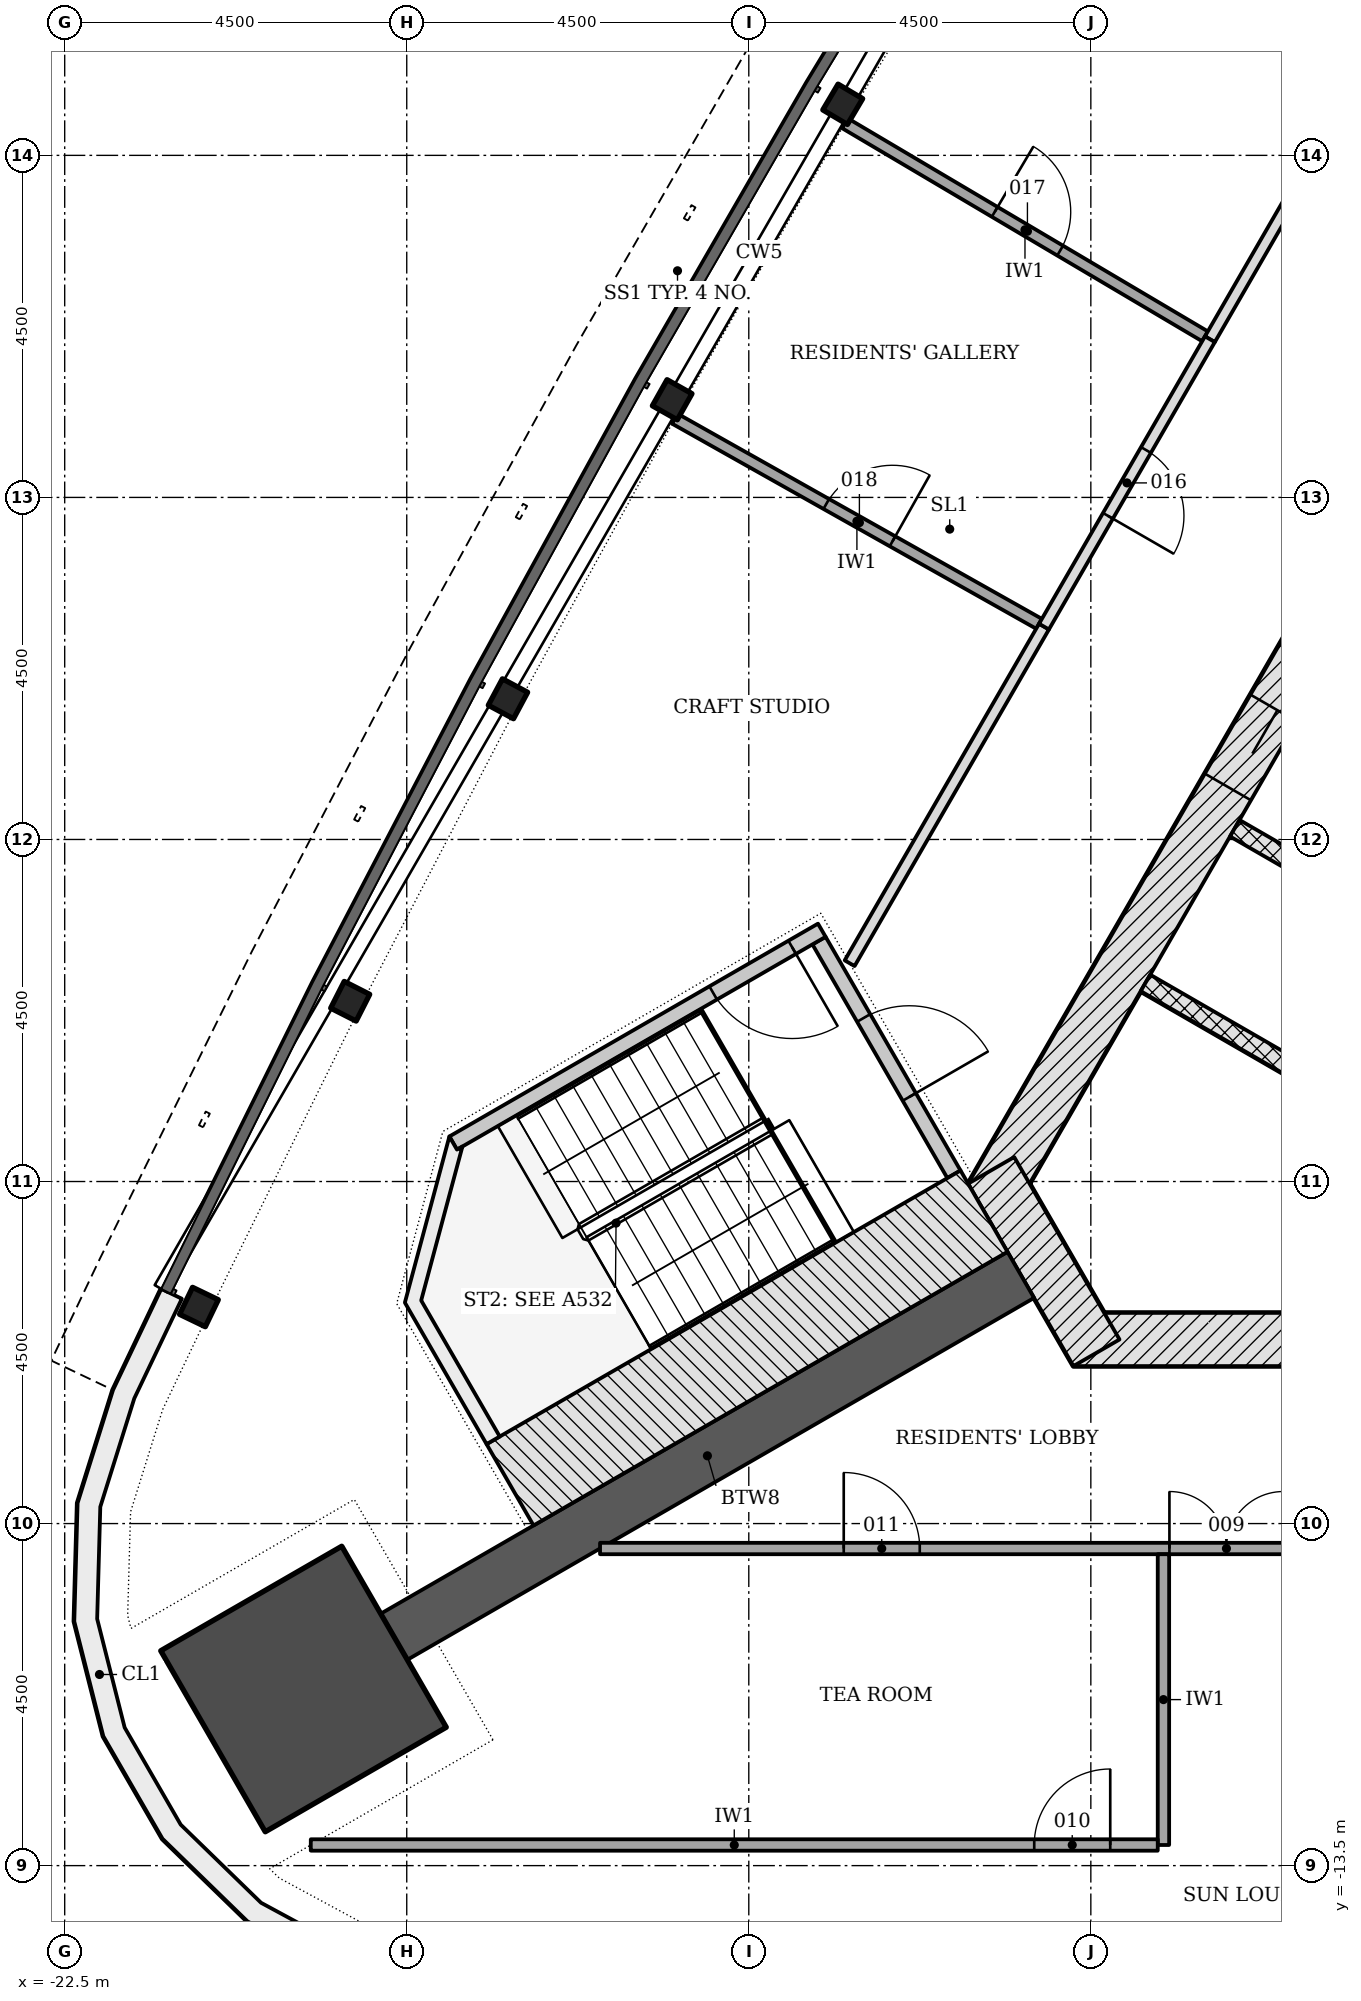
"""IFC4 building model, lengths in metres.
Left out: names, types, materials, properties, quantities, classifications, styles, units other than length and angle.
Written with IfcOpenShell. Run it as: python <this file> out.ifc"""

import sys

from ifc_helpers import new_model, si_unit, direction, frame, frame_2d, origin, origin_2d, place, context, subcontext, project, spatial, polyline, rectangle, i_section, outline, extrude, element, fill, save


model = new_model("IFC4")
c1 = context("Model", 3, precision=1e-05, world=origin(), true_north=direction((0.0, 1.0)))
c2 = subcontext(c1, "Body", "Model", "MODEL_VIEW")
j1 = project(units=[si_unit("LENGTHUNIT", "METRE"), si_unit("PLANEANGLEUNIT", "RADIAN")], contexts=[c1])
p1 = place(None, origin())
s1 = spatial("IfcSite", under=j1, at=p1, CompositionType="ELEMENT")
p2 = place(p1, origin())
s2 = spatial("IfcBuilding", under=s1, at=p2, CompositionType="ELEMENT")
p3 = place(p2, frame((0.0, 0.0, 188.7)))
s3 = spatial("IfcBuildingStorey", under=s2, at=p3, CompositionType="ELEMENT", Elevation=188.7)
p4 = place(p3, frame((-9.229, -6.578, -0.2), z_axis=(0.0, 0.0, 1.0), x_axis=(1.0, 0.0, 0.0)))
e1 = element("IfcWall", 1, at=p4, inside=s3, PredefinedType="SHEAR", context=c2, shape_type="SweptSolid", body=[
    extrude(rectangle(XDim=18.458, YDim=0.7, at=frame_2d((9.229, 0.0))), origin(), (0.0, 0.0, 1.0), 3.6),
])
p5 = place(p4, frame((9.5, 0.0, 0.2)))
e2 = element("IfcOpeningElement", 2, at=p5, cuts=e1, PredefinedType="OPENING", context=c2, shape_type="SweptSolid", body=[
    extrude(rectangle(XDim=1.0, YDim=2.1, at=frame_2d((0.5, 1.05))), frame((0.0, 0.36, 0.0), z_axis=(0.0, -1.0, 0.0), x_axis=(1.0, 0.0, 0.0)), (0.0, 0.0, 1.0), 0.72),
])
p6 = place(p4, frame((4.402, 0.0, 0.2)))
e3 = element("IfcOpeningElement", 3, at=p6, cuts=e1, PredefinedType="OPENING", context=c2, shape_type="SweptSolid", body=[
    extrude(rectangle(XDim=0.9, YDim=2.1, at=frame_2d((0.45, 1.05))), frame((0.0, 0.36, 0.0), z_axis=(0.0, -1.0, 0.0), x_axis=(1.0, 0.0, 0.0)), (0.0, 0.0, 1.0), 0.72),
])
p7 = place(p4, frame((13.927, 0.0, 0.2)))
e4 = element("IfcOpeningElement", 4, at=p7, cuts=e1, PredefinedType="OPENING", context=c2, shape_type="SweptSolid", body=[
    extrude(rectangle(XDim=0.9, YDim=2.1, at=frame_2d((0.45, 1.05))), frame((0.0, 0.36, 0.0), z_axis=(0.0, -1.0, 0.0), x_axis=(1.0, 0.0, 0.0)), (0.0, 0.0, 1.0), 0.72),
])
p8 = place(p3, frame((-1.083, 11.281, -0.2), z_axis=(0.0, 0.0, 1.0), x_axis=(-0.500001446645, -0.866024568562, 0.0)))
e5 = element("IfcWall", 5, at=p8, inside=s3, PredefinedType="SHEAR", context=c2, shape_type="SweptSolid", body=[
    extrude(rectangle(XDim=18.458, YDim=0.7, at=frame_2d((9.229, 0.0))), origin(), (0.0, 0.0, 1.0), 3.6),
])
p9 = place(p8, frame((8.979, 0.0, 0.2)))
e6 = element("IfcOpeningElement", 6, at=p9, cuts=e5, PredefinedType="OPENING", context=c2, shape_type="SweptSolid", body=[
    extrude(rectangle(XDim=1.2, YDim=2.1, at=frame_2d((0.6, 1.05))), frame((0.0, 0.36, 0.0), z_axis=(0.0, -1.0, 0.0), x_axis=(1.0, 0.0, 0.0)), (0.0, 0.0, 1.0), 0.72),
])
p10 = place(p8, frame((11.029, 0.0, 0.2)))
e7 = element("IfcOpeningElement", 7, at=p10, cuts=e5, PredefinedType="OPENING", context=c2, shape_type="SweptSolid", body=[
    extrude(rectangle(XDim=1.2, YDim=2.1, at=frame_2d((0.6, 1.05))), frame((0.0, 0.36, 0.0), z_axis=(0.0, -1.0, 0.0), x_axis=(1.0, 0.0, 0.0)), (0.0, 0.0, 1.0), 0.72),
])
p11 = place(p3, frame((-10.311, -4.353, -0.2), z_axis=(0.0, 0.0, 1.0), x_axis=(0.500042739161, -0.866000726912, 0.0)))
e8 = element("IfcWall", 8, at=p11, inside=s3, PredefinedType="SHEAR", context=c2, shape_type="SweptSolid", body=[
    extrude(rectangle(XDim=2.771, YDim=0.7, at=frame_2d((1.386, 0.0))), origin(), (0.0, 0.0, 1.0), 3.6),
])
p12 = place(p3, frame((-9.922, -5.728, -0.2), z_axis=(0.0, 0.0, 1.0), x_axis=(-0.866025463095, -0.499999897272, 0.0)))
e9 = element("IfcWall", 9, at=p12, inside=s3, PredefinedType="SHEAR", context=c2, shape_type="SweptSolid", body=[
    extrude(rectangle(XDim=9.521, YDim=0.7, at=frame_2d((4.761, 0.0))), origin(), (0.0, 0.0, 1.0), 3.6),
])
p13 = place(p3, frame((-19.358, -11.177, -0.2), z_axis=(0.0, 0.0, 1.0), x_axis=(-0.866025403784, -0.5, 0.0)))
e10 = element("IfcColumn", 10, at=p13, inside=s3, PredefinedType="COLUMN", context=c2, shape_type="SweptSolid", body=[
    extrude(rectangle(XDim=2.75, YDim=2.75, at=origin_2d()), origin(), (0.0, 0.0, 1.0), 3.6),
])
for number, where, z_axis, x_axis in (
    (11, (-12.264, 9.672, -0.2), (0.0, 0.0, 1.0), (-0.509, -0.861, 0.0)),
    (12, (-14.508, 5.785, -0.2), (0.0, 0.0, 1.0), (-0.491, -0.871, 0.0)),
    (13, (-16.668, 1.851, -0.2), (0.0, 0.0, 1.0), (-0.472, -0.882, 0.0)),
    (14, (-18.744, -2.128, -0.2), (0.0, 0.0, 1.0), (-0.453, -0.892, 0.0)),
    (15, (-20.734, -6.151, -0.2), (0.0, 0.0, 1.0), (-0.434, -0.901, 0.0)),
):
    element("IfcColumn", number, at=place(p3, frame(where, z_axis=z_axis, x_axis=x_axis)), inside=s3, PredefinedType="COLUMN", context=c2, shape_type="SweptSolid", body=[
        extrude(i_section(OverallWidth=0.394, OverallDepth=0.376, WebThickness=0.017, FlangeThickness=0.028, FilletRadius=0.015, at=origin_2d()), origin(), (0.0, 0.0, 1.0), 3.6),
    ])
p14 = place(p3, origin())
e16 = element("IfcWall", 16, at=p14, inside=s3, PredefinedType="NOTDEFINED", context=c2, shape_type="SweptSolid", body=[
    extrude(outline(polyline([(-21.229, -5.913), (-21.865, -7.243), (-22.33, -8.73), (-22.374, -10.287), (-21.992, -11.798), (-21.213, -13.147), (-20.096, -14.233), (-18.726, -14.974), (-17.205, -15.313), (-15.735, -15.429), (-15.712, -15.13), (-17.16, -15.016), (-18.619, -14.69), (-19.917, -13.989), (-20.974, -12.961), (-21.711, -11.684), (-22.073, -10.254), (-22.032, -8.78), (-21.584, -7.353), (-20.959, -6.042), (-21.229, -5.913)])), origin(), (0.0, 0.0, 1.0), 3.3),
])
for number, where, z_axis, x_axis in (
    (17, (-7.106, 0.148, -0.2), (0.0, 0.0, 1.0), (0.866, -0.5, 0.0)),
    (18, (-8.281, -1.887, -0.2), (0.0, 0.0, 1.0), (0.866, -0.5, 0.0)),
):
    element("IfcWall", number, at=place(p3, frame(where, z_axis=z_axis, x_axis=x_axis)), inside=s3, PredefinedType="PARTITIONING", context=c2, shape_type="SweptSolid", body=[
        extrude(rectangle(XDim=2.9, YDim=0.25, at=frame_2d((1.45, 0.0))), origin(), (0.0, 0.0, 1.0), 3.6),
    ])
p15 = place(p3, frame((-12.576, -1.331, -0.2), z_axis=(0.0, 0.0, 1.0), x_axis=(0.499970499736, -0.8660424351, 0.0)))
e19 = element("IfcWall", 19, at=p15, inside=s3, PredefinedType="SHEAR", context=c2, shape_type="SweptSolid", body=[
    extrude(rectangle(XDim=3.55, YDim=0.2, at=frame_2d((1.775, 0.0))), origin(), (0.0, 0.0, 1.0), 3.6),
])
p16 = place(p15, frame((1.175, 0.0, 0.2)))
e20 = element("IfcOpeningElement", 20, at=p16, cuts=e19, PredefinedType="OPENING", context=c2, shape_type="SweptSolid", body=[
    extrude(rectangle(XDim=1.2, YDim=2.1, at=frame_2d((0.6, 1.05))), frame((0.0, 0.11, 0.0), z_axis=(0.0, -1.0, 0.0), x_axis=(1.0, 0.0, 0.0)), (0.0, 0.0, 1.0), 0.22),
])
p17 = place(p3, frame((-12.539, -1.194, -0.2), z_axis=(0.0, 0.0, 1.0), x_axis=(-0.866045472092, -0.499965239061, 0.0)))
e21 = element("IfcWall", 21, at=p17, inside=s3, PredefinedType="SHEAR", context=c2, shape_type="SweptSolid", body=[
    extrude(rectangle(XDim=5.6, YDim=0.2, at=frame_2d((2.8, 0.0))), origin(), (0.0, 0.0, 1.0), 3.6),
])
p18 = place(p17, frame((0.45, 0.0, 0.2)))
e22 = element("IfcOpeningElement", 22, at=p18, cuts=e21, PredefinedType="OPENING", context=c2, shape_type="SweptSolid", body=[
    extrude(rectangle(XDim=1.2, YDim=2.1, at=frame_2d((0.6, 1.05))), frame((0.0, 0.11, 0.0), z_axis=(0.0, -1.0, 0.0), x_axis=(1.0, 0.0, 0.0)), (0.0, 0.0, 1.0), 0.22),
])
p19 = place(p3, frame((-10.406, -4.89, -0.2), z_axis=(0.0, 0.0, 1.0), x_axis=(-0.866018442252, -0.500012057535, 0.0)))
e23 = element("IfcWall", 23, at=p19, inside=s3, PredefinedType="SHEAR", context=c2, shape_type="SweptSolid", body=[
    extrude(rectangle(XDim=7.2, YDim=1.236, at=frame_2d((3.6, 0.0))), origin(), (0.0, 0.0, 1.0), 3.6),
])
p20 = place(p3, frame((0.0, 0.0, -0.2)))
e24 = element("IfcWall", 24, at=p20, inside=s3, PredefinedType="SHEAR", context=c2, shape_type="SweptSolid", body=[
    extrude(outline(polyline([(-17.439, -3.907), (-18.025, -6.093), (-16.95, -7.955), (-16.777, -7.855), (-17.81, -6.065), (-17.267, -4.039), (-17.339, -4.081), (-17.339, -4.081), (-17.339, -4.081), (-17.339, -4.081), (-17.339, -4.081), (-17.339, -4.081), (-17.339, -4.081), (-17.339, -4.081), (-17.339, -4.081), (-17.339, -4.081), (-17.339, -4.081), (-17.339, -4.081), (-17.339, -4.081), (-17.339, -4.081), (-17.339, -4.081), (-17.339, -4.081), (-17.339, -4.081), (-17.439, -3.907)])), origin(), (0.0, 0.0, 1.0), 3.6),
])
p21 = place(p3, frame((-15.457, -9.328, 0.0), z_axis=(0.0, 0.0, 1.0), x_axis=(1.0, 0.0, 0.0)))
e25 = element("IfcWall", 25, at=p21, inside=s3, PredefinedType="PARTITIONING", context=c2, shape_type="SweptSolid", body=[
    extrude(rectangle(XDim=9.12, YDim=0.15, at=frame_2d((4.56, 0.0))), origin(), (0.0, 0.0, 1.0), 2.852),
])
p22 = place(p21, frame((7.491, 0.0, 0.0)))
e26 = element("IfcOpeningElement", 26, at=p22, cuts=e25, PredefinedType="OPENING", context=c2, shape_type="SweptSolid", body=[
    extrude(rectangle(XDim=1.5, YDim=2.1, at=frame_2d((0.75, 1.05))), frame((0.0, 0.085, 0.0), z_axis=(0.0, -1.0, 0.0), x_axis=(1.0, 0.0, 0.0)), (0.0, 0.0, 1.0), 0.17),
])
p23 = place(p21, frame((3.206, 0.0, 0.0)))
e27 = element("IfcOpeningElement", 27, at=p23, cuts=e25, PredefinedType="OPENING", context=c2, shape_type="SweptSolid", body=[
    extrude(rectangle(XDim=1.0, YDim=2.1, at=frame_2d((0.5, 1.05))), frame((0.0, 0.085, 0.0), z_axis=(0.0, -1.0, 0.0), x_axis=(1.0, 0.0, 0.0)), (0.0, 0.0, 1.0), 0.17),
])
p24 = place(p3, frame((-8.045, -9.403, 0.0), z_axis=(0.0, 0.0, 1.0), x_axis=(0.0, -1.0, 0.0)))
e28 = element("IfcWall", 28, at=p24, inside=s3, PredefinedType="PARTITIONING", context=c2, shape_type="SweptSolid", body=[
    extrude(rectangle(XDim=3.825, YDim=0.15, at=frame_2d((1.913, 0.0))), origin(), (0.0, 0.0, 1.0), 3.4),
])
p25 = place(p3, frame((-19.262, -13.229, 0.0), z_axis=(0.0, 0.0, 1.0), x_axis=(1.0, 0.0, 0.0)))
e29 = element("IfcWall", 29, at=p25, inside=s3, PredefinedType="PARTITIONING", context=c2, shape_type="SweptSolid", body=[
    extrude(rectangle(XDim=11.143, YDim=0.15, at=frame_2d((5.571, 0.0))), origin(), (0.0, 0.0, 1.0), 2.852),
])
p26 = place(p25, frame((9.518, 0.0, 0.0)))
e30 = element("IfcOpeningElement", 30, at=p26, cuts=e29, PredefinedType="OPENING", context=c2, shape_type="SweptSolid", body=[
    extrude(rectangle(XDim=1.0, YDim=2.1, at=frame_2d((0.5, 1.05))), frame((0.0, 0.085, 0.0), z_axis=(0.0, -1.0, 0.0), x_axis=(1.0, 0.0, 0.0)), (0.0, 0.0, 1.0), 0.17),
])
p27 = place(p3, frame((-0.35, 18.85, 0.0), z_axis=(0.0, 0.0, 1.0), x_axis=(-0.500005388685, -0.866022292603, 0.0)))
e31 = element("IfcWall", 31, at=p27, inside=s3, PredefinedType="PARTITIONING", context=c2, shape_type="SweptSolid", body=[
    extrude(rectangle(XDim=14.167, YDim=0.15, at=frame_2d((7.083, 0.0))), origin(), (0.0, 0.0, 1.0), 2.852),
])
p28 = place(p3, frame((-9.616, 2.801, 0.0), z_axis=(0.0, 0.0, 1.0), x_axis=(-0.499995206172, -0.866028171485, 0.0)))
e32 = element("IfcWall", 32, at=p28, inside=s3, PredefinedType="PARTITIONING", context=c2, shape_type="SweptSolid", body=[
    extrude(rectangle(XDim=5.114, YDim=0.15, at=frame_2d((2.557, 0.0))), origin(), (0.0, 0.0, 1.0), 2.852),
])
p29 = place(p3, frame((-12.235, 9.422, 0.0), z_axis=(0.0, 0.0, 1.0), x_axis=(0.860631434237, -0.509228371562, 0.0)))
e33 = element("IfcWall", 33, at=p29, inside=s3, PredefinedType="PARTITIONING", context=c2, shape_type="SweptSolid", body=[
    extrude(rectangle(XDim=5.504, YDim=0.15, at=frame_2d((2.752, 0.0))), origin(), (0.0, 0.0, 1.0), 2.461),
])
p30 = place(p29, frame((2.29, 0.0, 0.0)))
e34 = element("IfcOpeningElement", 34, at=p30, cuts=e33, PredefinedType="OPENING", context=c2, shape_type="SweptSolid", body=[
    extrude(rectangle(XDim=1.0, YDim=2.1, at=frame_2d((0.5, 1.05))), frame((0.0, 0.085, 0.0), z_axis=(0.0, -1.0, 0.0), x_axis=(1.0, 0.0, 0.0)), (0.0, 0.0, 1.0), 0.17),
])
p31 = place(p3, frame((-14.474, 5.536, 0.0), z_axis=(0.0, 0.0, 1.0), x_axis=(0.871324088074, -0.490707992132, 0.0)))
e35 = element("IfcWall", 35, at=p31, inside=s3, PredefinedType="PARTITIONING", context=c2, shape_type="SweptSolid", body=[
    extrude(rectangle(XDim=5.5, YDim=0.15, at=frame_2d((2.75, 0.0))), origin(), (0.0, 0.0, 1.0), 2.461),
])
p32 = place(p31, frame((2.287, 0.0, 0.0)))
e36 = element("IfcOpeningElement", 36, at=p32, cuts=e35, PredefinedType="OPENING", context=c2, shape_type="SweptSolid", body=[
    extrude(rectangle(XDim=1.0, YDim=2.1, at=frame_2d((0.5, 1.05))), frame((0.0, 0.085, 0.0), z_axis=(0.0, -1.0, 0.0), x_axis=(1.0, 0.0, 0.0)), (0.0, 0.0, 1.0), 0.17),
])
p33 = place(p3, frame((-7.434, 6.581, 0.0), z_axis=(0.0, 0.0, 1.0), x_axis=(-0.499964504253, -0.866045896294, 0.0)))
e37 = element("IfcWall", 37, at=p33, inside=s3, PredefinedType="PARTITIONING", context=c2, shape_type="SweptSolid", body=[
    extrude(rectangle(XDim=4.365, YDim=0.15, at=frame_2d((2.183, 0.0))), origin(), (0.0, 0.0, 1.0), 2.852),
])
p34 = place(p33, frame((1.683, 0.0, 0.0)))
e38 = element("IfcOpeningElement", 38, at=p34, cuts=e37, PredefinedType="OPENING", context=c2, shape_type="SweptSolid", body=[
    extrude(rectangle(XDim=1.0, YDim=2.1, at=frame_2d((0.5, 1.05))), frame((0.0, 0.085, 0.0), z_axis=(0.0, -1.0, 0.0), x_axis=(1.0, 0.0, 0.0)), (0.0, 0.0, 1.0), 0.17),
])
p35 = place(p10, origin())
e39 = element("IfcDoor", 39, at=p35, inside=s3, OperationType="DOUBLE_DOOR_SLIDING", PredefinedType="DOOR", context=c2, shape_type="SweptSolid", body=[
    extrude(rectangle(XDim=1.2, YDim=2.1, at=frame_2d((0.6, 1.05))), frame((0.0, 0.025, 0.0), z_axis=(0.0, -1.0, 0.0), x_axis=(1.0, 0.0, 0.0)), (0.0, 0.0, 1.0), 0.05),
])
fill(e7, e39)
p36 = place(p16, origin())
e40 = element("IfcDoor", 40, at=p36, inside=s3, OperationType="SINGLE_SWING_RIGHT", PredefinedType="DOOR", context=c2, shape_type="SweptSolid", body=[
    extrude(rectangle(XDim=1.2, YDim=2.1, at=frame_2d((0.6, 1.05))), frame((0.0, 0.025, 0.0), z_axis=(0.0, -1.0, 0.0), x_axis=(1.0, 0.0, 0.0)), (0.0, 0.0, 1.0), 0.05),
])
fill(e20, e40)
p37 = place(p18, origin())
e41 = element("IfcDoor", 41, at=p37, inside=s3, OperationType="SINGLE_SWING_LEFT", PredefinedType="DOOR", context=c2, shape_type="SweptSolid", body=[
    extrude(rectangle(XDim=1.2, YDim=2.1, at=frame_2d((0.6, 1.05))), frame((0.0, 0.025, 0.0), z_axis=(0.0, -1.0, 0.0), x_axis=(1.0, 0.0, 0.0)), (0.0, 0.0, 1.0), 0.05),
])
fill(e22, e41)
p38 = place(p22, origin())
e42 = element("IfcDoor", 42, at=p38, inside=s3, OperationType="DOUBLE_DOOR_SINGLE_SWING", PredefinedType="DOOR", context=c2, shape_type="SweptSolid", body=[
    extrude(rectangle(XDim=1.5, YDim=2.1, at=frame_2d((0.75, 1.05))), frame((0.0, 0.025, 0.0), z_axis=(0.0, -1.0, 0.0), x_axis=(1.0, 0.0, 0.0)), (0.0, 0.0, 1.0), 0.05),
])
fill(e26, e42)
p39 = place(p26, origin())
e43 = element("IfcDoor", 43, at=p39, inside=s3, OperationType="SINGLE_SWING_RIGHT", PredefinedType="DOOR", context=c2, shape_type="SweptSolid", body=[
    extrude(rectangle(XDim=1.0, YDim=2.1, at=frame_2d((0.5, 1.05))), frame((0.0, 0.025, 0.0), z_axis=(0.0, -1.0, 0.0), x_axis=(1.0, 0.0, 0.0)), (0.0, 0.0, 1.0), 0.05),
])
fill(e30, e43)
p40 = place(p23, origin())
e44 = element("IfcDoor", 44, at=p40, inside=s3, OperationType="SINGLE_SWING_LEFT", PredefinedType="DOOR", context=c2, shape_type="SweptSolid", body=[
    extrude(rectangle(XDim=1.0, YDim=2.1, at=frame_2d((0.5, 1.05))), frame((0.0, 0.025, 0.0), z_axis=(0.0, -1.0, 0.0), x_axis=(1.0, 0.0, 0.0)), (0.0, 0.0, 1.0), 0.05),
])
fill(e27, e44)
p41 = place(p34, origin())
e45 = element("IfcDoor", 45, at=p41, inside=s3, OperationType="SINGLE_SWING_RIGHT", PredefinedType="DOOR", context=c2, shape_type="SweptSolid", body=[
    extrude(rectangle(XDim=1.0, YDim=2.1, at=frame_2d((0.5, 1.05))), frame((0.0, 0.025, 0.0), z_axis=(0.0, -1.0, 0.0), x_axis=(1.0, 0.0, 0.0)), (0.0, 0.0, 1.0), 0.05),
])
fill(e38, e45)
p42 = place(p30, origin())
e46 = element("IfcDoor", 46, at=p42, inside=s3, OperationType="SINGLE_SWING_LEFT", PredefinedType="DOOR", context=c2, shape_type="SweptSolid", body=[
    extrude(rectangle(XDim=1.0, YDim=2.1, at=frame_2d((0.5, 1.05))), frame((0.0, 0.025, 0.0), z_axis=(0.0, -1.0, 0.0), x_axis=(1.0, 0.0, 0.0)), (0.0, 0.0, 1.0), 0.05),
])
fill(e34, e46)
p43 = place(p32, origin())
e47 = element("IfcDoor", 47, at=p43, inside=s3, OperationType="SINGLE_SWING_RIGHT", PredefinedType="DOOR", context=c2, shape_type="SweptSolid", body=[
    extrude(rectangle(XDim=1.0, YDim=2.1, at=frame_2d((0.5, 1.05))), frame((0.0, 0.025, 0.0), z_axis=(0.0, -1.0, 0.0), x_axis=(1.0, 0.0, 0.0)), (0.0, 0.0, 1.0), 0.05),
])
fill(e36, e47)
save(model, sys.argv[1])
